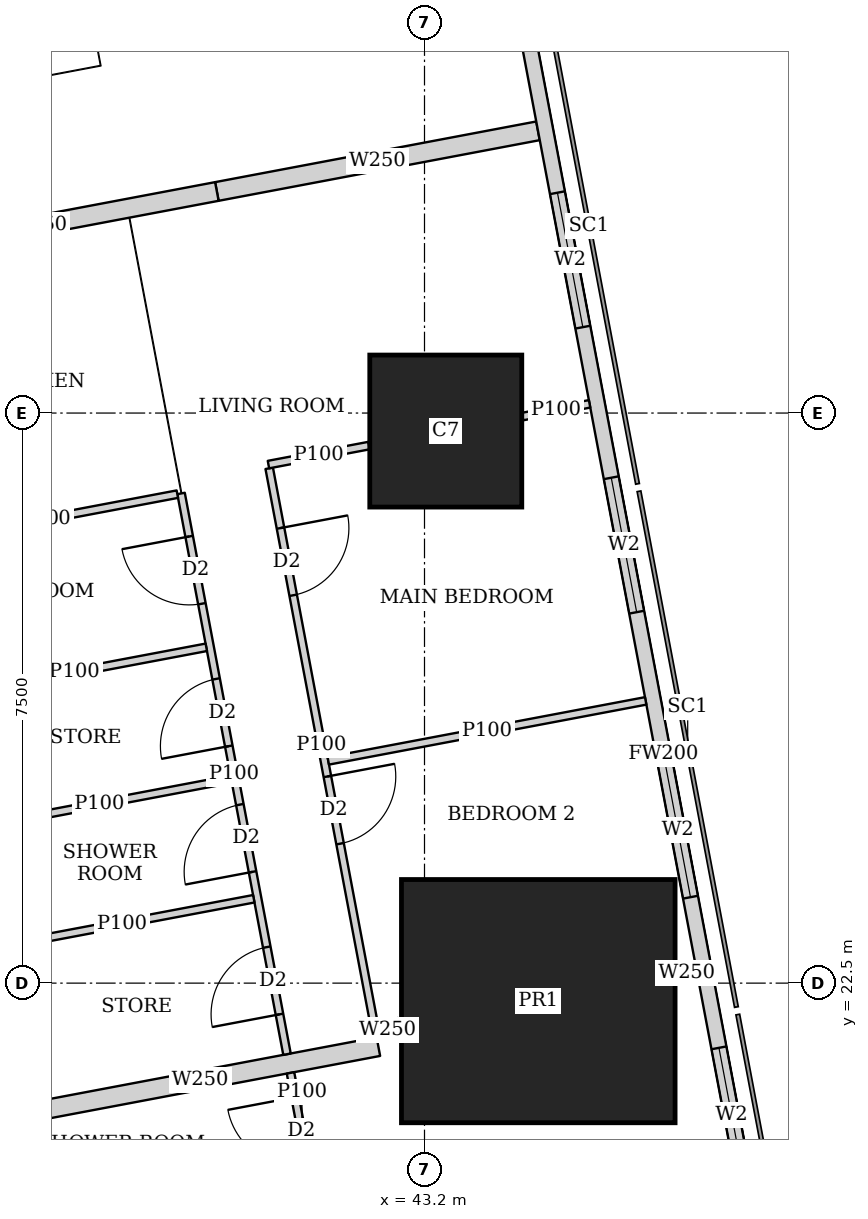
"""IFC4 building model, lengths in metres.
Left out: names, types, materials, properties, quantities, classifications, styles, units other than length and angle.
Written with IfcOpenShell. Run it as: python <this file> out.ifc"""

import sys

from ifc_helpers import new_model, si_unit, direction, frame, frame_2d, origin, origin_2d, place, context, subcontext, project, spatial, rectangle, extrude, element, fill, save


model = new_model("IFC4")
c1 = context("Model", 3, precision=1e-05, world=origin(), true_north=direction((0.0, 1.0)))
c2 = subcontext(c1, "Body", "Model", "MODEL_VIEW")
j1 = project(units=[si_unit("LENGTHUNIT", "METRE"), si_unit("PLANEANGLEUNIT", "RADIAN")], contexts=[c1])
p1 = place(None, origin())
s1 = spatial("IfcSite", under=j1, at=p1, CompositionType="ELEMENT")
p2 = place(p1, origin())
s2 = spatial("IfcBuilding", under=s1, at=p2, CompositionType="ELEMENT")
p3 = place(p2, frame((0.0, 0.0, 255.35)))
s3 = spatial("IfcBuildingStorey", under=s2, at=p3, CompositionType="ELEMENT", Elevation=255.35)
p4 = place(p3, frame((44.697, 22.263, 0.0), z_axis=(0.0, 0.0, 1.0), x_axis=(1.0, 0.0, 0.0)))
e1 = element("IfcColumn", 1, at=p4, inside=s3, PredefinedType="COLUMN", context=c2, shape_type="SweptSolid", body=[
    extrude(rectangle(XDim=3.6, YDim=3.2, at=origin_2d()), origin(), (0.0, 0.0, 1.0), 3.75),
])
p5 = place(p3, frame((43.48, 29.763, 0.0), z_axis=(0.0, 0.0, 1.0), x_axis=(1.0, 0.0, 0.0)))
e2 = element("IfcColumn", 2, at=p5, inside=s3, PredefinedType="COLUMN", context=c2, shape_type="SweptSolid", body=[
    extrude(rectangle(XDim=2.0, YDim=2.0, at=origin_2d()), origin(), (0.0, 0.0, 1.0), 3.75),
])
p6 = place(p3, frame((49.684, 7.832, 0.0), z_axis=(0.0, 0.0, 1.0), x_axis=(-0.185616669694, 0.982622232565, 0.0)))
e3 = element("IfcWall", 3, at=p6, inside=s3, PredefinedType="SOLIDWALL", context=c2, shape_type="SweptSolid", body=[
    extrude(rectangle(XDim=36.0, YDim=0.2, at=frame_2d((18.0, 0.0))), origin(), (0.0, 0.0, 1.0), 3.5),
])
p7 = place(p6, frame((2.518, 0.0, 0.9)))
e4 = element("IfcOpeningElement", 4, at=p7, cuts=e3, PredefinedType="OPENING", context=c2, shape_type="SweptSolid", body=[
    extrude(rectangle(XDim=2.4, YDim=1.5, at=frame_2d((1.2, 0.75))), frame((0.0, 0.11, 0.0), z_axis=(0.0, -1.0, 0.0), x_axis=(1.0, 0.0, 0.0)), (0.0, 0.0, 1.0), 0.22),
])
p8 = place(p6, frame((8.444, 0.0, 0.9)))
e5 = element("IfcOpeningElement", 5, at=p8, cuts=e3, PredefinedType="OPENING", context=c2, shape_type="SweptSolid", body=[
    extrude(rectangle(XDim=1.8, YDim=1.5, at=frame_2d((0.9, 0.75))), frame((0.0, 0.11, 0.0), z_axis=(0.0, -1.0, 0.0), x_axis=(1.0, 0.0, 0.0)), (0.0, 0.0, 1.0), 0.22),
])
p9 = place(p6, frame((12.261, 0.0, 0.9)))
e6 = element("IfcOpeningElement", 6, at=p9, cuts=e3, PredefinedType="OPENING", context=c2, shape_type="SweptSolid", body=[
    extrude(rectangle(XDim=1.8, YDim=1.5, at=frame_2d((0.9, 0.75))), frame((0.0, 0.11, 0.0), z_axis=(0.0, -1.0, 0.0), x_axis=(1.0, 0.0, 0.0)), (0.0, 0.0, 1.0), 0.22),
])
p10 = place(p6, frame((16.078, 0.0, 0.9)))
e7 = element("IfcOpeningElement", 7, at=p10, cuts=e3, PredefinedType="OPENING", context=c2, shape_type="SweptSolid", body=[
    extrude(rectangle(XDim=1.8, YDim=1.5, at=frame_2d((0.9, 0.75))), frame((0.0, 0.11, 0.0), z_axis=(0.0, -1.0, 0.0), x_axis=(1.0, 0.0, 0.0)), (0.0, 0.0, 1.0), 0.22),
])
p11 = place(p6, frame((19.894, 0.0, 0.9)))
e8 = element("IfcOpeningElement", 8, at=p11, cuts=e3, PredefinedType="OPENING", context=c2, shape_type="SweptSolid", body=[
    extrude(rectangle(XDim=1.8, YDim=1.5, at=frame_2d((0.9, 0.75))), frame((0.0, 0.11, 0.0), z_axis=(0.0, -1.0, 0.0), x_axis=(1.0, 0.0, 0.0)), (0.0, 0.0, 1.0), 0.22),
])
p12 = place(p6, frame((23.71, 0.0, 0.9)))
e9 = element("IfcOpeningElement", 9, at=p12, cuts=e3, PredefinedType="OPENING", context=c2, shape_type="SweptSolid", body=[
    extrude(rectangle(XDim=1.8, YDim=1.5, at=frame_2d((0.9, 0.75))), frame((0.0, 0.11, 0.0), z_axis=(0.0, -1.0, 0.0), x_axis=(1.0, 0.0, 0.0)), (0.0, 0.0, 1.0), 0.22),
])
p13 = place(p6, frame((27.526, 0.0, 0.9)))
e10 = element("IfcOpeningElement", 10, at=p13, cuts=e3, PredefinedType="OPENING", context=c2, shape_type="SweptSolid", body=[
    extrude(rectangle(XDim=1.8, YDim=1.5, at=frame_2d((0.9, 0.75))), frame((0.0, 0.11, 0.0), z_axis=(0.0, -1.0, 0.0), x_axis=(1.0, 0.0, 0.0)), (0.0, 0.0, 1.0), 0.22),
])
p14 = place(p6, frame((32.046, 0.0, 0.9)))
e11 = element("IfcOpeningElement", 11, at=p14, cuts=e3, PredefinedType="OPENING", context=c2, shape_type="SweptSolid", body=[
    extrude(rectangle(XDim=1.8, YDim=1.5, at=frame_2d((0.9, 0.75))), frame((0.0, 0.11, 0.0), z_axis=(0.0, -1.0, 0.0), x_axis=(1.0, 0.0, 0.0)), (0.0, 0.0, 1.0), 0.22),
])
p15 = place(p3, frame((33.781, 42.186, 0.0), z_axis=(0.0, 0.0, 1.0), x_axis=(0.185593518645, -0.9826266055, 0.0)))
e12 = element("IfcWall", 12, at=p15, inside=s3, PredefinedType="SOLIDWALL", context=c2, shape_type="SweptSolid", body=[
    extrude(rectangle(XDim=35.961, YDim=0.15, at=frame_2d((17.98, 0.0))), origin(), (0.0, 0.0, 1.0), 2.5),
])
p16 = place(p15, frame((7.183, 0.0, 0.0)))
e13 = element("IfcOpeningElement", 13, at=p16, cuts=e12, PredefinedType="OPENING", context=c2, shape_type="SweptSolid", body=[
    extrude(rectangle(XDim=1.0, YDim=2.1, at=frame_2d((0.5, 1.05))), frame((0.0, 0.085, 0.0), z_axis=(0.0, -1.0, 0.0), x_axis=(1.0, 0.0, 0.0)), (0.0, 0.0, 1.0), 0.17),
])
p17 = place(p15, frame((11.76, 0.0, 0.0)))
e14 = element("IfcOpeningElement", 14, at=p17, cuts=e12, PredefinedType="OPENING", context=c2, shape_type="SweptSolid", body=[
    extrude(rectangle(XDim=1.0, YDim=2.1, at=frame_2d((0.5, 1.05))), frame((0.0, 0.085, 0.0), z_axis=(0.0, -1.0, 0.0), x_axis=(1.0, 0.0, 0.0)), (0.0, 0.0, 1.0), 0.17),
])
p18 = place(p15, frame((23.863, 0.0, 0.0)))
e15 = element("IfcOpeningElement", 15, at=p18, cuts=e12, PredefinedType="OPENING", context=c2, shape_type="SweptSolid", body=[
    extrude(rectangle(XDim=1.0, YDim=2.1, at=frame_2d((0.5, 1.05))), frame((0.0, 0.085, 0.0), z_axis=(0.0, -1.0, 0.0), x_axis=(1.0, 0.0, 0.0)), (0.0, 0.0, 1.0), 0.17),
])
p19 = place(p15, frame((30.502, 0.0, 0.0)))
e16 = element("IfcOpeningElement", 16, at=p19, cuts=e12, PredefinedType="OPENING", context=c2, shape_type="SweptSolid", body=[
    extrude(rectangle(XDim=1.0, YDim=2.1, at=frame_2d((0.5, 1.05))), frame((0.0, 0.085, 0.0), z_axis=(0.0, -1.0, 0.0), x_axis=(1.0, 0.0, 0.0)), (0.0, 0.0, 1.0), 0.17),
])
p20 = place(p3, frame((41.157, 29.273, 0.0), z_axis=(0.0, 0.0, 1.0), x_axis=(0.18542464283, -0.982658486877, 0.0)))
e17 = element("IfcWall", 17, at=p20, inside=s3, PredefinedType="PARTITIONING", context=c2, shape_type="SweptSolid", body=[
    extrude(rectangle(XDim=7.421, YDim=0.1, at=frame_2d((3.71, 0.0))), origin(), (0.0, 0.0, 1.0), 2.5),
])
p21 = place(p20, frame((0.8, 0.0, 0.0)))
e18 = element("IfcOpeningElement", 18, at=p21, cuts=e17, PredefinedType="OPENING", context=c2, shape_type="SweptSolid", body=[
    extrude(rectangle(XDim=0.9, YDim=2.1, at=frame_2d((0.45, 1.05))), frame((0.0, 0.06, 0.0), z_axis=(0.0, -1.0, 0.0), x_axis=(1.0, 0.0, 0.0)), (0.0, 0.0, 1.0), 0.12),
])
p22 = place(p20, frame((4.126, 0.0, 0.0)))
e19 = element("IfcOpeningElement", 19, at=p22, cuts=e17, PredefinedType="OPENING", context=c2, shape_type="SweptSolid", body=[
    extrude(rectangle(XDim=0.9, YDim=2.1, at=frame_2d((0.45, 1.05))), frame((0.0, 0.06, 0.0), z_axis=(0.0, -1.0, 0.0), x_axis=(1.0, 0.0, 0.0)), (0.0, 0.0, 1.0), 0.12),
])
p23 = place(p3, frame((39.997, 28.942, 0.0), z_axis=(0.0, 0.0, 1.0), x_axis=(0.185686318797, -0.982609073341, 0.0)))
e20 = element("IfcWall", 20, at=p23, inside=s3, PredefinedType="PARTITIONING", context=c2, shape_type="SweptSolid", body=[
    extrude(rectangle(XDim=7.508, YDim=0.1, at=frame_2d((3.754, 0.0))), origin(), (0.0, 0.0, 1.0), 2.5),
])
p24 = place(p23, frame((0.576, 0.0, 0.0)))
e21 = element("IfcOpeningElement", 21, at=p24, cuts=e20, PredefinedType="OPENING", context=c2, shape_type="SweptSolid", body=[
    extrude(rectangle(XDim=0.9, YDim=2.1, at=frame_2d((0.45, 1.05))), frame((0.0, 0.06, 0.0), z_axis=(0.0, -1.0, 0.0), x_axis=(1.0, 0.0, 0.0)), (0.0, 0.0, 1.0), 0.12),
])
p25 = place(p23, frame((4.166, 0.0, 0.0)))
e22 = element("IfcOpeningElement", 22, at=p25, cuts=e20, PredefinedType="OPENING", context=c2, shape_type="SweptSolid", body=[
    extrude(rectangle(XDim=0.9, YDim=2.1, at=frame_2d((0.45, 1.05))), frame((0.0, 0.06, 0.0), z_axis=(0.0, -1.0, 0.0), x_axis=(1.0, 0.0, 0.0)), (0.0, 0.0, 1.0), 0.12),
])
p26 = place(p23, frame((2.483, 0.0, 0.0)))
e23 = element("IfcOpeningElement", 23, at=p26, cuts=e20, PredefinedType="OPENING", context=c2, shape_type="SweptSolid", body=[
    extrude(rectangle(XDim=0.9, YDim=2.1, at=frame_2d((0.45, 1.05))), frame((0.0, 0.06, 0.0), z_axis=(0.0, -1.0, 0.0), x_axis=(1.0, 0.0, 0.0)), (0.0, 0.0, 1.0), 0.12),
])
p27 = place(p23, frame((6.074, 0.0, 0.0)))
e24 = element("IfcOpeningElement", 24, at=p27, cuts=e20, PredefinedType="OPENING", context=c2, shape_type="SweptSolid", body=[
    extrude(rectangle(XDim=0.9, YDim=2.1, at=frame_2d((0.45, 1.05))), frame((0.0, 0.06, 0.0), z_axis=(0.0, -1.0, 0.0), x_axis=(1.0, 0.0, 0.0)), (0.0, 0.0, 1.0), 0.12),
])
p28 = place(p3, frame((45.372, 30.121, 0.0), z_axis=(0.0, 0.0, 1.0), x_axis=(-0.982547416156, -0.186012297994, 0.0)))
e25 = element("IfcWall", 25, at=p28, inside=s3, PredefinedType="PARTITIONING", context=c2, shape_type="SweptSolid", body=[
    extrude(rectangle(XDim=0.898, YDim=0.1, at=frame_2d((0.449, 0.0))), origin(), (0.0, 0.0, 1.0), 3.5),
])
p29 = place(p3, frame((42.47, 29.572, 0.0), z_axis=(0.0, 0.0, 1.0), x_axis=(-0.982610503289, -0.185678751683, 0.0)))
e26 = element("IfcWall", 26, at=p29, inside=s3, PredefinedType="PARTITIONING", context=c2, shape_type="SweptSolid", body=[
    extrude(rectangle(XDim=1.346, YDim=0.1, at=frame_2d((0.673, 0.0))), origin(), (0.0, 0.0, 1.0), 2.5),
])
p30 = place(p3, frame((46.11, 26.213, 0.0), z_axis=(0.0, 0.0, 1.0), x_axis=(-0.982623519589, -0.185609856287, 0.0)))
e27 = element("IfcWall", 27, at=p30, inside=s3, PredefinedType="PARTITIONING", context=c2, shape_type="SweptSolid", body=[
    extrude(rectangle(XDim=4.25, YDim=0.1, at=frame_2d((2.125, 0.0))), origin(), (0.0, 0.0, 1.0), 2.5),
])
p31 = place(p3, frame((39.948, 28.933, 0.0), z_axis=(0.0, 0.0, 1.0), x_axis=(-0.982588017646, -0.185797706064, 0.0)))
e28 = element("IfcWall", 28, at=p31, inside=s3, PredefinedType="PARTITIONING", context=c2, shape_type="SweptSolid", body=[
    extrude(rectangle(XDim=3.525, YDim=0.1, at=frame_2d((1.763, 0.0))), origin(), (0.0, 0.0, 1.0), 3.5),
])
p32 = place(p3, frame((40.656, 25.183, 0.0), z_axis=(0.0, 0.0, 1.0), x_axis=(-0.982576058723, -0.185860939478, 0.0)))
e29 = element("IfcWall", 29, at=p32, inside=s3, PredefinedType="PARTITIONING", context=c2, shape_type="SweptSolid", body=[
    extrude(rectangle(XDim=3.524, YDim=0.1, at=frame_2d((1.762, 0.0))), origin(), (0.0, 0.0, 1.0), 3.5),
])
p33 = place(p3, frame((40.329, 26.918, 0.0), z_axis=(0.0, 0.0, 1.0), x_axis=(-0.982638553676, -0.185530247748, 0.0)))
e30 = element("IfcWall", 30, at=p33, inside=s3, PredefinedType="PARTITIONING", context=c2, shape_type="SweptSolid", body=[
    extrude(rectangle(XDim=3.525, YDim=0.1, at=frame_2d((1.763, 0.0))), origin(), (0.0, 0.0, 1.0), 3.5),
])
p34 = place(p3, frame((40.954, 23.61, 0.0), z_axis=(0.0, 0.0, 1.0), x_axis=(-0.98264808502, -0.18547975902, 0.0)))
e31 = element("IfcWall", 31, at=p34, inside=s3, PredefinedType="PARTITIONING", context=c2, shape_type="SweptSolid", body=[
    extrude(rectangle(XDim=3.526, YDim=0.1, at=frame_2d((1.763, 0.0))), origin(), (0.0, 0.0, 1.0), 2.5),
])
p35 = place(p3, frame((44.693, 33.713, 0.0), z_axis=(0.0, 0.0, 1.0), x_axis=(-0.982633535512, -0.185556823879, 0.0)))
e32 = element("IfcWall", 32, at=p35, inside=s3, PredefinedType="SOLIDWALL", context=c2, shape_type="SweptSolid", body=[
    extrude(rectangle(XDim=4.3, YDim=0.25, at=frame_2d((2.15, 0.0))), origin(), (0.0, 0.0, 1.0), 2.5),
])
p36 = place(p3, frame((40.468, 32.915, 0.0), z_axis=(0.0, 0.0, 1.0), x_axis=(-0.982635807605, -0.185544791394, 0.0)))
e33 = element("IfcWall", 33, at=p36, inside=s3, PredefinedType="SOLIDWALL", context=c2, shape_type="SweptSolid", body=[
    extrude(rectangle(XDim=4.775, YDim=0.25, at=frame_2d((2.388, 0.0))), origin(), (0.0, 0.0, 1.0), 3.5),
])
p37 = place(p3, frame((41.437, 21.319, 0.0), z_axis=(0.0, 0.0, 1.0), x_axis=(0.185793689589, -0.982588777113, 0.0)))
e34 = element("IfcWall", 34, at=p37, inside=s3, PredefinedType="PARTITIONING", context=c2, shape_type="SweptSolid", body=[
    extrude(rectangle(XDim=1.625, YDim=0.1, at=frame_2d((0.813, 0.0))), origin(), (0.0, 0.0, 1.0), 3.5),
])
p38 = place(p37, frame((0.325, 0.0, 0.0)))
e35 = element("IfcOpeningElement", 35, at=p38, cuts=e34, PredefinedType="OPENING", context=c2, shape_type="SweptSolid", body=[
    extrude(rectangle(XDim=0.9, YDim=2.1, at=frame_2d((0.45, 1.05))), frame((0.0, 0.06, 0.0), z_axis=(0.0, -1.0, 0.0), x_axis=(1.0, 0.0, 0.0)), (0.0, 0.0, 1.0), 0.12),
])
p39 = place(p3, frame((46.782, 22.657, 0.0), z_axis=(0.0, 0.0, 1.0), x_axis=(-0.982104607121, -0.188336243648, 0.0)))
e36 = element("IfcWall", 36, at=p39, inside=s3, PredefinedType="SOLIDWALL", context=c2, shape_type="SweptSolid", body=[
    extrude(rectangle(XDim=0.266, YDim=0.25, at=frame_2d((0.133, 0.0))), origin(), (0.0, 0.0, 1.0), 3.5),
])
p40 = place(p3, frame((42.873, 21.918, 0.0), z_axis=(0.0, 0.0, 1.0), x_axis=(-0.982431406936, -0.186624035603, 0.0)))
e37 = element("IfcWall", 37, at=p40, inside=s3, PredefinedType="SOLIDWALL", context=c2, shape_type="SweptSolid", body=[
    extrude(rectangle(XDim=0.322, YDim=0.25, at=frame_2d((0.161, 0.0))), origin(), (0.0, 0.0, 1.0), 2.5),
])
p41 = place(p3, frame((42.593, 21.665, 0.0), z_axis=(0.0, 0.0, 1.0), x_axis=(-0.982635807605, -0.185544791394, 0.0)))
e38 = element("IfcWall", 38, at=p41, inside=s3, PredefinedType="SOLIDWALL", context=c2, shape_type="SweptSolid", body=[
    extrude(rectangle(XDim=4.775, YDim=0.25, at=frame_2d((2.388, 0.0))), origin(), (0.0, 0.0, 1.0), 2.5),
])
p42 = place(p9, origin())
e39 = element("IfcWindow", 39, at=p42, inside=s3, PartitioningType="SINGLE_PANEL", PredefinedType="WINDOW", context=c2, shape_type="SweptSolid", body=[
    extrude(rectangle(XDim=1.8, YDim=1.5, at=frame_2d((0.9, 0.75))), frame((0.0, 0.03, 0.0), z_axis=(0.0, -1.0, 0.0), x_axis=(1.0, 0.0, 0.0)), (0.0, 0.0, 1.0), 0.06),
])
fill(e6, e39)
p43 = place(p10, origin())
e40 = element("IfcWindow", 40, at=p43, inside=s3, PartitioningType="SINGLE_PANEL", PredefinedType="WINDOW", context=c2, shape_type="SweptSolid", body=[
    extrude(rectangle(XDim=1.8, YDim=1.5, at=frame_2d((0.9, 0.75))), frame((0.0, 0.03, 0.0), z_axis=(0.0, -1.0, 0.0), x_axis=(1.0, 0.0, 0.0)), (0.0, 0.0, 1.0), 0.06),
])
fill(e7, e40)
p44 = place(p11, origin())
e41 = element("IfcWindow", 41, at=p44, inside=s3, PartitioningType="SINGLE_PANEL", PredefinedType="WINDOW", context=c2, shape_type="SweptSolid", body=[
    extrude(rectangle(XDim=1.8, YDim=1.5, at=frame_2d((0.9, 0.75))), frame((0.0, 0.03, 0.0), z_axis=(0.0, -1.0, 0.0), x_axis=(1.0, 0.0, 0.0)), (0.0, 0.0, 1.0), 0.06),
])
fill(e8, e41)
p45 = place(p12, origin())
e42 = element("IfcWindow", 42, at=p45, inside=s3, PartitioningType="SINGLE_PANEL", PredefinedType="WINDOW", context=c2, shape_type="SweptSolid", body=[
    extrude(rectangle(XDim=1.8, YDim=1.5, at=frame_2d((0.9, 0.75))), frame((0.0, 0.03, 0.0), z_axis=(0.0, -1.0, 0.0), x_axis=(1.0, 0.0, 0.0)), (0.0, 0.0, 1.0), 0.06),
])
fill(e9, e42)
p46 = place(p21, origin())
e43 = element("IfcDoor", 43, at=p46, inside=s3, OperationType="SINGLE_SWING_LEFT", PredefinedType="DOOR", context=c2, shape_type="SweptSolid", body=[
    extrude(rectangle(XDim=0.9, YDim=2.1, at=frame_2d((0.45, 1.05))), frame((0.0, 0.025, 0.0), z_axis=(0.0, -1.0, 0.0), x_axis=(1.0, 0.0, 0.0)), (0.0, 0.0, 1.0), 0.05),
])
fill(e18, e43)
p47 = place(p22, origin())
e44 = element("IfcDoor", 44, at=p47, inside=s3, OperationType="SINGLE_SWING_LEFT", PredefinedType="DOOR", context=c2, shape_type="SweptSolid", body=[
    extrude(rectangle(XDim=0.9, YDim=2.1, at=frame_2d((0.45, 1.05))), frame((0.0, 0.025, 0.0), z_axis=(0.0, -1.0, 0.0), x_axis=(1.0, 0.0, 0.0)), (0.0, 0.0, 1.0), 0.05),
])
fill(e19, e44)
p48 = place(p24, origin())
e45 = element("IfcDoor", 45, at=p48, inside=s3, OperationType="SINGLE_SWING_RIGHT", PredefinedType="DOOR", context=c2, shape_type="SweptSolid", body=[
    extrude(rectangle(XDim=0.9, YDim=2.1, at=frame_2d((0.45, 1.05))), frame((0.0, 0.025, 0.0), z_axis=(0.0, -1.0, 0.0), x_axis=(1.0, 0.0, 0.0)), (0.0, 0.0, 1.0), 0.05),
])
fill(e21, e45)
p49 = place(p25, origin())
e46 = element("IfcDoor", 46, at=p49, inside=s3, OperationType="SINGLE_SWING_LEFT", PredefinedType="DOOR", context=c2, shape_type="SweptSolid", body=[
    extrude(rectangle(XDim=0.9, YDim=2.1, at=frame_2d((0.45, 1.05))), frame((0.0, 0.025, 0.0), z_axis=(0.0, -1.0, 0.0), x_axis=(1.0, 0.0, 0.0)), (0.0, 0.0, 1.0), 0.05),
])
fill(e22, e46)
p50 = place(p26, origin())
e47 = element("IfcDoor", 47, at=p50, inside=s3, OperationType="SINGLE_SWING_LEFT", PredefinedType="DOOR", context=c2, shape_type="SweptSolid", body=[
    extrude(rectangle(XDim=0.9, YDim=2.1, at=frame_2d((0.45, 1.05))), frame((0.0, 0.025, 0.0), z_axis=(0.0, -1.0, 0.0), x_axis=(1.0, 0.0, 0.0)), (0.0, 0.0, 1.0), 0.05),
])
fill(e23, e47)
p51 = place(p27, origin())
e48 = element("IfcDoor", 48, at=p51, inside=s3, OperationType="SINGLE_SWING_LEFT", PredefinedType="DOOR", context=c2, shape_type="SweptSolid", body=[
    extrude(rectangle(XDim=0.9, YDim=2.1, at=frame_2d((0.45, 1.05))), frame((0.0, 0.025, 0.0), z_axis=(0.0, -1.0, 0.0), x_axis=(1.0, 0.0, 0.0)), (0.0, 0.0, 1.0), 0.05),
])
fill(e24, e48)
p52 = place(p38, origin())
e49 = element("IfcDoor", 49, at=p52, inside=s3, OperationType="SINGLE_SWING_RIGHT", PredefinedType="DOOR", context=c2, shape_type="SweptSolid", body=[
    extrude(rectangle(XDim=0.9, YDim=2.1, at=frame_2d((0.45, 1.05))), frame((0.0, 0.025, 0.0), z_axis=(0.0, -1.0, 0.0), x_axis=(1.0, 0.0, 0.0)), (0.0, 0.0, 1.0), 0.05),
])
fill(e35, e49)
save(model, sys.argv[1])
